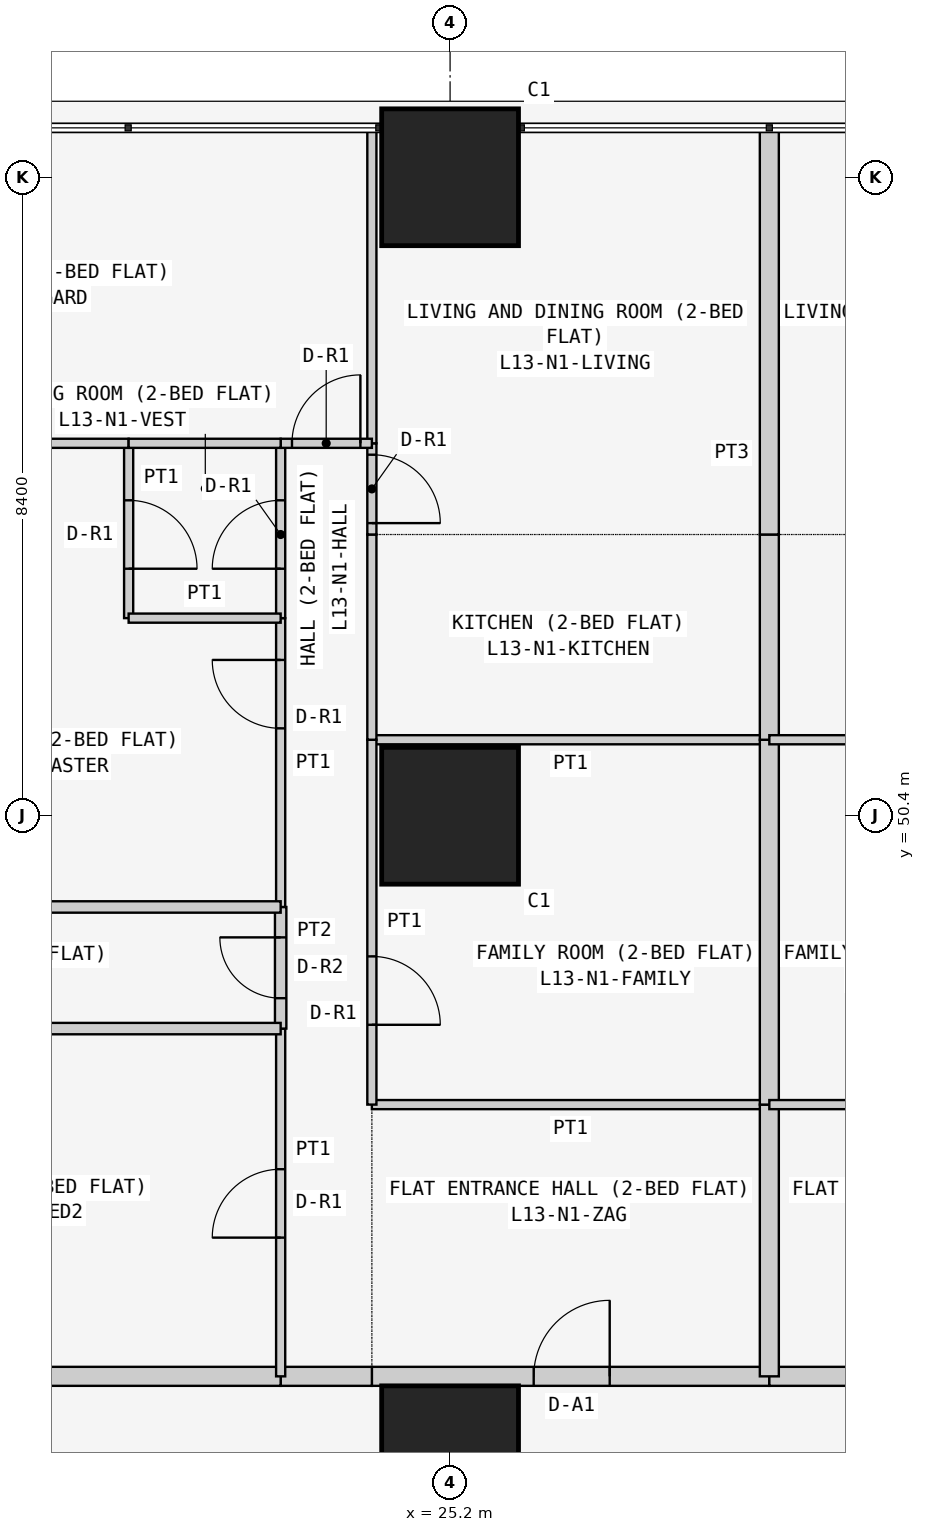
"""IFC4 building model, lengths in metres.
Left out: names, types, materials, properties, quantities, classifications, styles, units other than length and angle.
Written with IfcOpenShell. Run it as: python <this file> out.ifc"""

import sys

from ifc_helpers import new_model, si_unit, direction, frame, frame_2d, origin, origin_2d, place, context, subcontext, project, spatial, rectangle, extrude, element, fill, save


model = new_model("IFC4")
c1 = context("Model", 3, precision=1e-05, world=origin(), true_north=direction((0.0, 1.0)))
c2 = subcontext(c1, "Body", "Model", "MODEL_VIEW")
j1 = project(units=[si_unit("LENGTHUNIT", "METRE"), si_unit("PLANEANGLEUNIT", "RADIAN")], contexts=[c1])
p1 = place(None, origin())
s1 = spatial("IfcSite", under=j1, at=p1, CompositionType="ELEMENT")
p2 = place(p1, origin())
s2 = spatial("IfcBuilding", under=s1, at=p2, CompositionType="ELEMENT")
p3 = place(p2, frame((0.0, 0.0, 56.1)))
s3 = spatial("IfcBuildingStorey", under=s2, at=p3, CompositionType="ELEMENT", Elevation=56.1)
for number, where, z_axis, x_axis in (
    (1, (25.2, 42.0, 0.0), (0.0, 0.0, 1.0), (1.0, 0.0, 0.0)),
    (2, (25.2, 50.4, 0.0), (0.0, 0.0, 1.0), (1.0, 0.0, 0.0)),
    (3, (25.2, 58.8, 0.0), (0.0, 0.0, 1.0), (1.0, 0.0, 0.0)),
):
    element("IfcColumn", number, at=place(p3, frame(where, z_axis=z_axis, x_axis=x_axis)), inside=s3, PredefinedType="COLUMN", context=c2, shape_type="SweptSolid", body=[
        extrude(rectangle(XDim=1.8, YDim=1.8, at=origin_2d()), origin(), (0.0, 0.0, 1.0), 3.6),
    ])
p4 = place(p3, frame((24.171, 43.025, 0.0), z_axis=(0.0, 0.0, 1.0), x_axis=(1.0, 0.0, 0.0)))
e4 = element("IfcWall", 4, at=p4, inside=s3, PredefinedType="PARTITIONING", context=c2, shape_type="SweptSolid", body=[
    extrude(rectangle(XDim=5.229, YDim=0.25, at=frame_2d((2.615, 0.0))), origin(), (0.0, 0.0, 1.0), 3.45),
])
p5 = place(p4, frame((2.129, 0.0, 0.0)))
e5 = element("IfcOpeningElement", 5, at=p5, cuts=e4, PredefinedType="OPENING", context=c2, shape_type="SweptSolid", body=[
    extrude(rectangle(XDim=1.0, YDim=2.1, at=frame_2d((0.5, 1.05))), frame((0.0, 0.135, 0.0), z_axis=(0.0, -1.0, 0.0), x_axis=(1.0, 0.0, 0.0)), (0.0, 0.0, 1.0), 0.27),
])
p6 = place(p3, frame((22.971, 43.025, 0.0), z_axis=(0.0, 0.0, 1.0), x_axis=(1.0, 0.0, 0.0)))
e6 = element("IfcWall", 6, at=p6, inside=s3, PredefinedType="PARTITIONING", context=c2, shape_type="SweptSolid", body=[
    extrude(rectangle(XDim=1.2, YDim=0.25, at=frame_2d((0.6, 0.0))), origin(), (0.0, 0.0, 1.0), 3.45),
])
p7 = place(p3, frame((16.1, 43.025, 0.0), z_axis=(0.0, 0.0, 1.0), x_axis=(1.0, 0.0, 0.0)))
e7 = element("IfcWall", 7, at=p7, inside=s3, PredefinedType="PARTITIONING", context=c2, shape_type="SweptSolid", body=[
    extrude(rectangle(XDim=6.871, YDim=0.25, at=frame_2d((3.436, 0.0))), origin(), (0.0, 0.0, 1.0), 3.45),
])
p8 = place(p3, frame((29.4, 43.025, 0.0), z_axis=(0.0, 0.0, 1.0), x_axis=(1.0, 0.0, 0.0)))
e8 = element("IfcWall", 8, at=p8, inside=s3, PredefinedType="PARTITIONING", context=c2, shape_type="SweptSolid", body=[
    extrude(rectangle(XDim=5.229, YDim=0.25, at=frame_2d((2.615, 0.0))), origin(), (0.0, 0.0, 1.0), 3.45),
])
p9 = place(p8, frame((2.1, 0.0, 0.0)))
e9 = element("IfcOpeningElement", 9, at=p9, cuts=e8, PredefinedType="OPENING", context=c2, shape_type="SweptSolid", body=[
    extrude(rectangle(XDim=1.0, YDim=2.1, at=frame_2d((0.5, 1.05))), frame((0.0, 0.135, 0.0), z_axis=(0.0, -1.0, 0.0), x_axis=(1.0, 0.0, 0.0)), (0.0, 0.0, 1.0), 0.27),
])
p10 = place(p3, frame((29.4, 46.6, 0.0), z_axis=(0.0, 0.0, 1.0), x_axis=(-1.0, 0.0, 0.0)))
e10 = element("IfcWall", 10, at=p10, inside=s3, PredefinedType="PARTITIONING", context=c2, shape_type="SweptSolid", body=[
    extrude(rectangle(XDim=5.229, YDim=0.12, at=frame_2d((2.615, 0.0))), origin(), (0.0, 0.0, 1.0), 3.45),
])
p11 = place(p3, frame((29.4, 43.025, 0.0), z_axis=(0.0, 0.0, 1.0), x_axis=(0.0, 1.0, 0.0)))
e11 = element("IfcWall", 11, at=p11, inside=s3, PredefinedType="PARTITIONING", context=c2, shape_type="SweptSolid", body=[
    extrude(rectangle(XDim=3.575, YDim=0.25, at=frame_2d((1.788, 0.0))), origin(), (0.0, 0.0, 1.0), 2.848),
])
p12 = place(p3, frame((29.4, 51.4, 0.0), z_axis=(0.0, 0.0, 1.0), x_axis=(-1.0, 0.0, 0.0)))
e12 = element("IfcWall", 12, at=p12, inside=s3, PredefinedType="PARTITIONING", context=c2, shape_type="SweptSolid", body=[
    extrude(rectangle(XDim=5.229, YDim=0.12, at=frame_2d((2.615, 0.0))), origin(), (0.0, 0.0, 1.0), 3.45),
])
p13 = place(p3, frame((24.171, 51.4, 0.0), z_axis=(0.0, 0.0, 1.0), x_axis=(0.0, -1.0, 0.0)))
e13 = element("IfcWall", 13, at=p13, inside=s3, PredefinedType="PARTITIONING", context=c2, shape_type="SweptSolid", body=[
    extrude(rectangle(XDim=4.8, YDim=0.12, at=frame_2d((2.4, 0.0))), origin(), (0.0, 0.0, 1.0), 3.45),
])
p14 = place(p13, frame((2.85, 0.0, 0.0)))
e14 = element("IfcOpeningElement", 14, at=p14, cuts=e13, PredefinedType="OPENING", context=c2, shape_type="SweptSolid", body=[
    extrude(rectangle(XDim=0.9, YDim=2.1, at=frame_2d((0.45, 1.05))), frame((0.0, 0.07, 0.0), z_axis=(0.0, -1.0, 0.0), x_axis=(1.0, 0.0, 0.0)), (0.0, 0.0, 1.0), 0.14),
])
p15 = place(p3, frame((29.4, 46.6, 0.0), z_axis=(0.0, 0.0, 1.0), x_axis=(0.0, 1.0, 0.0)))
e15 = element("IfcWall", 15, at=p15, inside=s3, PredefinedType="PARTITIONING", context=c2, shape_type="SweptSolid", body=[
    extrude(rectangle(XDim=4.8, YDim=0.25, at=frame_2d((2.4, 0.0))), origin(), (0.0, 0.0, 1.0), 2.848),
])
p16 = place(p3, frame((24.171, 54.1, 0.0), z_axis=(0.0, 0.0, 1.0), x_axis=(0.0, -1.0, 0.0)))
e16 = element("IfcWall", 16, at=p16, inside=s3, PredefinedType="PARTITIONING", context=c2, shape_type="SweptSolid", body=[
    extrude(rectangle(XDim=2.7, YDim=0.12, at=frame_2d((1.35, 0.0))), origin(), (0.0, 0.0, 1.0), 3.45),
])
p17 = place(p3, frame((29.4, 51.4, 0.0), z_axis=(0.0, 0.0, 1.0), x_axis=(0.0, 1.0, 0.0)))
e17 = element("IfcWall", 17, at=p17, inside=s3, PredefinedType="PARTITIONING", context=c2, shape_type="SweptSolid", body=[
    extrude(rectangle(XDim=2.7, YDim=0.25, at=frame_2d((1.35, 0.0))), origin(), (0.0, 0.0, 1.0), 2.848),
])
p18 = place(p3, frame((24.171, 55.3, 0.0), z_axis=(0.0, 0.0, 1.0), x_axis=(0.0, -1.0, 0.0)))
e18 = element("IfcWall", 18, at=p18, inside=s3, PredefinedType="PARTITIONING", context=c2, shape_type="SweptSolid", body=[
    extrude(rectangle(XDim=1.2, YDim=0.12, at=frame_2d((0.6, 0.0))), origin(), (0.0, 0.0, 1.0), 3.45),
])
p19 = place(p18, frame((0.15, 0.0, 0.0)))
e19 = element("IfcOpeningElement", 19, at=p19, cuts=e18, PredefinedType="OPENING", context=c2, shape_type="SweptSolid", body=[
    extrude(rectangle(XDim=0.9, YDim=2.1, at=frame_2d((0.45, 1.05))), frame((0.0, 0.07, 0.0), z_axis=(0.0, -1.0, 0.0), x_axis=(1.0, 0.0, 0.0)), (0.0, 0.0, 1.0), 0.14),
])
p20 = place(p3, frame((24.171, 59.45, 0.0), z_axis=(0.0, 0.0, 1.0), x_axis=(0.0, -1.0, 0.0)))
e20 = element("IfcWall", 20, at=p20, inside=s3, PredefinedType="PARTITIONING", context=c2, shape_type="SweptSolid", body=[
    extrude(rectangle(XDim=4.15, YDim=0.12, at=frame_2d((2.075, 0.0))), origin(), (0.0, 0.0, 1.0), 3.45),
])
p21 = place(p3, frame((29.4, 54.1, 0.0), z_axis=(0.0, 0.0, 1.0), x_axis=(0.0, 1.0, 0.0)))
e21 = element("IfcWall", 21, at=p21, inside=s3, PredefinedType="PARTITIONING", context=c2, shape_type="SweptSolid", body=[
    extrude(rectangle(XDim=5.35, YDim=0.25, at=frame_2d((2.675, 0.0))), origin(), (0.0, 0.0, 1.0), 2.848),
])
p22 = place(p3, frame((22.971, 47.6, 0.0), z_axis=(0.0, 0.0, 1.0), x_axis=(0.0, -1.0, 0.0)))
e22 = element("IfcWall", 22, at=p22, inside=s3, PredefinedType="PARTITIONING", context=c2, shape_type="SweptSolid", body=[
    extrude(rectangle(XDim=4.575, YDim=0.12, at=frame_2d((2.288, 0.0))), origin(), (0.0, 0.0, 1.0), 3.45),
])
p23 = place(p22, frame((1.85, 0.0, 0.0)))
e23 = element("IfcOpeningElement", 23, at=p23, cuts=e22, PredefinedType="OPENING", context=c2, shape_type="SweptSolid", body=[
    extrude(rectangle(XDim=0.9, YDim=2.1, at=frame_2d((0.45, 1.05))), frame((0.0, 0.07, 0.0), z_axis=(0.0, -1.0, 0.0), x_axis=(1.0, 0.0, 0.0)), (0.0, 0.0, 1.0), 0.14),
])
p24 = place(p3, frame((22.971, 49.2, 0.0), z_axis=(0.0, 0.0, 1.0), x_axis=(0.0, -1.0, 0.0)))
e24 = element("IfcWall", 24, at=p24, inside=s3, PredefinedType="PARTITIONING", context=c2, shape_type="SweptSolid", body=[
    extrude(rectangle(XDim=1.6, YDim=0.15, at=frame_2d((0.8, 0.0))), origin(), (0.0, 0.0, 1.0), 3.45),
])
p25 = place(p24, frame((0.4, 0.0, 0.0)))
e25 = element("IfcOpeningElement", 25, at=p25, cuts=e24, PredefinedType="OPENING", context=c2, shape_type="SweptSolid", body=[
    extrude(rectangle(XDim=0.8, YDim=2.1, at=frame_2d((0.4, 1.05))), frame((0.0, 0.085, 0.0), z_axis=(0.0, -1.0, 0.0), x_axis=(1.0, 0.0, 0.0)), (0.0, 0.0, 1.0), 0.17),
])
p26 = place(p3, frame((22.971, 53.0, 0.0), z_axis=(0.0, 0.0, 1.0), x_axis=(0.0, -1.0, 0.0)))
e26 = element("IfcWall", 26, at=p26, inside=s3, PredefinedType="PARTITIONING", context=c2, shape_type="SweptSolid", body=[
    extrude(rectangle(XDim=3.8, YDim=0.12, at=frame_2d((1.9, 0.0))), origin(), (0.0, 0.0, 1.0), 3.45),
])
p27 = place(p26, frame((0.55, 0.0, 0.0)))
e27 = element("IfcOpeningElement", 27, at=p27, cuts=e26, PredefinedType="OPENING", context=c2, shape_type="SweptSolid", body=[
    extrude(rectangle(XDim=0.9, YDim=2.1, at=frame_2d((0.45, 1.05))), frame((0.0, 0.07, 0.0), z_axis=(0.0, -1.0, 0.0), x_axis=(1.0, 0.0, 0.0)), (0.0, 0.0, 1.0), 0.14),
])
p28 = place(p3, frame((22.971, 55.3, 0.0), z_axis=(0.0, 0.0, 1.0), x_axis=(0.0, -1.0, 0.0)))
e28 = element("IfcWall", 28, at=p28, inside=s3, PredefinedType="PARTITIONING", context=c2, shape_type="SweptSolid", body=[
    extrude(rectangle(XDim=2.3, YDim=0.12, at=frame_2d((1.15, 0.0))), origin(), (0.0, 0.0, 1.0), 3.45),
])
p29 = place(p28, frame((0.75, 0.0, 0.0)))
e29 = element("IfcOpeningElement", 29, at=p29, cuts=e28, PredefinedType="OPENING", context=c2, shape_type="SweptSolid", body=[
    extrude(rectangle(XDim=0.9, YDim=2.1, at=frame_2d((0.45, 1.05))), frame((0.0, 0.07, 0.0), z_axis=(0.0, -1.0, 0.0), x_axis=(1.0, 0.0, 0.0)), (0.0, 0.0, 1.0), 0.14),
])
p30 = place(p3, frame((24.171, 55.3, 0.0), z_axis=(0.0, 0.0, 1.0), x_axis=(-1.0, 0.0, 0.0)))
e30 = element("IfcWall", 30, at=p30, inside=s3, PredefinedType="PARTITIONING", context=c2, shape_type="SweptSolid", body=[
    extrude(rectangle(XDim=1.2, YDim=0.12, at=frame_2d((0.6, 0.0))), origin(), (0.0, 0.0, 1.0), 3.45),
])
p31 = place(p30, frame((0.151, 0.0, 0.0)))
e31 = element("IfcOpeningElement", 31, at=p31, cuts=e30, PredefinedType="OPENING", context=c2, shape_type="SweptSolid", body=[
    extrude(rectangle(XDim=0.9, YDim=2.1, at=frame_2d((0.45, 1.05))), frame((0.0, 0.07, 0.0), z_axis=(0.0, -1.0, 0.0), x_axis=(1.0, 0.0, 0.0)), (0.0, 0.0, 1.0), 0.14),
])
for number, where, z_axis, x_axis in (
    (32, (22.971, 47.6, 0.0), (0.0, 0.0, 1.0), (-1.0, 0.0, 0.0)),
    (33, (22.971, 49.2, 0.0), (0.0, 0.0, 1.0), (-1.0, 0.0, 0.0)),
):
    element("IfcWall", number, at=place(p3, frame(where, z_axis=z_axis, x_axis=x_axis)), inside=s3, PredefinedType="PARTITIONING", context=c2, shape_type="SweptSolid", body=[
        extrude(rectangle(XDim=6.871, YDim=0.15, at=frame_2d((3.436, 0.0))), origin(), (0.0, 0.0, 1.0), 3.45),
    ])
p32 = place(p3, frame((20.971, 55.3, 0.0), z_axis=(0.0, 0.0, 1.0), x_axis=(0.0, -1.0, 0.0)))
e34 = element("IfcWall", 34, at=p32, inside=s3, PredefinedType="PARTITIONING", context=c2, shape_type="SweptSolid", body=[
    extrude(rectangle(XDim=2.3, YDim=0.12, at=frame_2d((1.15, 0.0))), origin(), (0.0, 0.0, 1.0), 2.848),
])
p33 = place(p32, frame((0.75, 0.0, 0.0)))
e35 = element("IfcOpeningElement", 35, at=p33, cuts=e34, PredefinedType="OPENING", context=c2, shape_type="SweptSolid", body=[
    extrude(rectangle(XDim=0.9, YDim=2.1, at=frame_2d((0.45, 1.05))), frame((0.0, 0.07, 0.0), z_axis=(0.0, -1.0, 0.0), x_axis=(1.0, 0.0, 0.0)), (0.0, 0.0, 1.0), 0.14),
])
p34 = place(p3, frame((20.971, 53.0, 0.0), z_axis=(0.0, 0.0, 1.0), x_axis=(1.0, 0.0, 0.0)))
e36 = element("IfcWall", 36, at=p34, inside=s3, PredefinedType="PARTITIONING", context=c2, shape_type="SweptSolid", body=[
    extrude(rectangle(XDim=2.0, YDim=0.12, at=frame_2d((1.0, 0.0))), origin(), (0.0, 0.0, 1.0), 3.45),
])
p35 = place(p3, frame((16.1, 55.3, 0.0), z_axis=(0.0, 0.0, 1.0), x_axis=(1.0, 0.0, 0.0)))
e37 = element("IfcWall", 37, at=p35, inside=s3, PredefinedType="PARTITIONING", context=c2, shape_type="SweptSolid", body=[
    extrude(rectangle(XDim=4.871, YDim=0.12, at=frame_2d((2.436, 0.0))), origin(), (0.0, 0.0, 1.0), 3.45),
])
p36 = place(p3, frame((22.971, 55.3, 0.0), z_axis=(0.0, 0.0, 1.0), x_axis=(-1.0, 0.0, 0.0)))
e38 = element("IfcWall", 38, at=p36, inside=s3, PredefinedType="PARTITIONING", context=c2, shape_type="SweptSolid", body=[
    extrude(rectangle(XDim=2.0, YDim=0.12, at=frame_2d((1.0, 0.0))), origin(), (0.0, 0.0, 1.0), 3.45),
])
for number, where, z_axis, x_axis in (
    (39, (29.4, 46.6, 0.0), (0.0, 0.0, 1.0), (1.0, 0.0, 0.0)),
    (40, (29.4, 51.4, 0.0), (0.0, 0.0, 1.0), (1.0, 0.0, 0.0)),
):
    element("IfcWall", number, at=place(p3, frame(where, z_axis=z_axis, x_axis=x_axis)), inside=s3, PredefinedType="PARTITIONING", context=c2, shape_type="SweptSolid", body=[
        extrude(rectangle(XDim=5.229, YDim=0.12, at=frame_2d((2.615, 0.0))), origin(), (0.0, 0.0, 1.0), 3.45),
    ])
p37 = place(p5, origin())
e41 = element("IfcDoor", 41, at=p37, inside=s3, OperationType="SINGLE_SWING_RIGHT", PredefinedType="DOOR", context=c2, shape_type="SweptSolid", body=[
    extrude(rectangle(XDim=1.0, YDim=2.1, at=frame_2d((0.5, 1.05))), frame((0.0, 0.025, 0.0), z_axis=(0.0, -1.0, 0.0), x_axis=(1.0, 0.0, 0.0)), (0.0, 0.0, 1.0), 0.05),
])
fill(e5, e41)
p38 = place(p14, origin())
e42 = element("IfcDoor", 42, at=p38, inside=s3, OperationType="SINGLE_SWING_RIGHT", PredefinedType="DOOR", context=c2, shape_type="SweptSolid", body=[
    extrude(rectangle(XDim=0.9, YDim=2.1, at=frame_2d((0.45, 1.05))), frame((0.0, 0.025, 0.0), z_axis=(0.0, -1.0, 0.0), x_axis=(1.0, 0.0, 0.0)), (0.0, 0.0, 1.0), 0.05),
])
fill(e14, e42)
p39 = place(p19, origin())
e43 = element("IfcDoor", 43, at=p39, inside=s3, OperationType="SINGLE_SWING_RIGHT", PredefinedType="DOOR", context=c2, shape_type="SweptSolid", body=[
    extrude(rectangle(XDim=0.9, YDim=2.1, at=frame_2d((0.45, 1.05))), frame((0.0, 0.025, 0.0), z_axis=(0.0, -1.0, 0.0), x_axis=(1.0, 0.0, 0.0)), (0.0, 0.0, 1.0), 0.05),
])
fill(e19, e43)
p40 = place(p23, frame((0.9, 0.0, 0.0), z_axis=(0.0, 0.0, 1.0), x_axis=(-1.0, 0.0, 0.0)))
e44 = element("IfcDoor", 44, at=p40, inside=s3, OperationType="SINGLE_SWING_LEFT", PredefinedType="DOOR", context=c2, shape_type="SweptSolid", body=[
    extrude(rectangle(XDim=0.9, YDim=2.1, at=frame_2d((0.45, 1.05))), frame((0.0, 0.025, 0.0), z_axis=(0.0, -1.0, 0.0), x_axis=(1.0, 0.0, 0.0)), (0.0, 0.0, 1.0), 0.05),
])
fill(e23, e44)
p41 = place(p25, frame((0.8, 0.0, 0.0), z_axis=(0.0, 0.0, 1.0), x_axis=(-1.0, 0.0, 0.0)))
e45 = element("IfcDoor", 45, at=p41, inside=s3, OperationType="SINGLE_SWING_RIGHT", PredefinedType="DOOR", context=c2, shape_type="SweptSolid", body=[
    extrude(rectangle(XDim=0.8, YDim=2.1, at=frame_2d((0.4, 1.05))), frame((0.0, 0.025, 0.0), z_axis=(0.0, -1.0, 0.0), x_axis=(1.0, 0.0, 0.0)), (0.0, 0.0, 1.0), 0.05),
])
fill(e25, e45)
p42 = place(p27, frame((0.9, 0.0, 0.0), z_axis=(0.0, 0.0, 1.0), x_axis=(-1.0, 0.0, 0.0)))
e46 = element("IfcDoor", 46, at=p42, inside=s3, OperationType="SINGLE_SWING_RIGHT", PredefinedType="DOOR", context=c2, shape_type="SweptSolid", body=[
    extrude(rectangle(XDim=0.9, YDim=2.1, at=frame_2d((0.45, 1.05))), frame((0.0, 0.025, 0.0), z_axis=(0.0, -1.0, 0.0), x_axis=(1.0, 0.0, 0.0)), (0.0, 0.0, 1.0), 0.05),
])
fill(e27, e46)
p43 = place(p29, frame((0.9, 0.0, 0.0), z_axis=(0.0, 0.0, 1.0), x_axis=(-1.0, 0.0, 0.0)))
e47 = element("IfcDoor", 47, at=p43, inside=s3, OperationType="SINGLE_SWING_LEFT", PredefinedType="DOOR", context=c2, shape_type="SweptSolid", body=[
    extrude(rectangle(XDim=0.9, YDim=2.1, at=frame_2d((0.45, 1.05))), frame((0.0, 0.025, 0.0), z_axis=(0.0, -1.0, 0.0), x_axis=(1.0, 0.0, 0.0)), (0.0, 0.0, 1.0), 0.05),
])
fill(e29, e47)
p44 = place(p33, origin())
e48 = element("IfcDoor", 48, at=p44, inside=s3, OperationType="SINGLE_SWING_RIGHT", PredefinedType="DOOR", context=c2, shape_type="SweptSolid", body=[
    extrude(rectangle(XDim=0.9, YDim=2.1, at=frame_2d((0.45, 1.05))), frame((0.0, 0.025, 0.0), z_axis=(0.0, -1.0, 0.0), x_axis=(1.0, 0.0, 0.0)), (0.0, 0.0, 1.0), 0.05),
])
fill(e35, e48)
p45 = place(p31, frame((0.9, 0.0, 0.0), z_axis=(0.0, 0.0, 1.0), x_axis=(-1.0, 0.0, 0.0)))
e49 = element("IfcDoor", 49, at=p45, inside=s3, OperationType="SINGLE_SWING_RIGHT", PredefinedType="DOOR", context=c2, shape_type="SweptSolid", body=[
    extrude(rectangle(XDim=0.9, YDim=2.1, at=frame_2d((0.45, 1.05))), frame((0.0, 0.025, 0.0), z_axis=(0.0, -1.0, 0.0), x_axis=(1.0, 0.0, 0.0)), (0.0, 0.0, 1.0), 0.05),
])
fill(e31, e49)
save(model, sys.argv[1])
